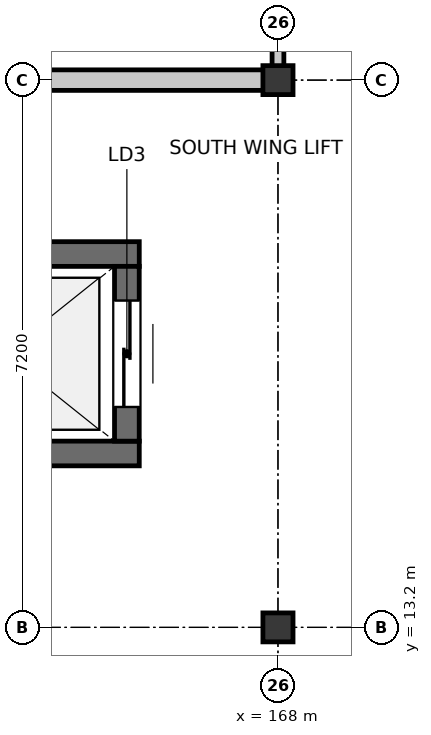
"""IFC4 building model, lengths in metres.
Left out: names, types, materials, properties, quantities, classifications, styles, units other than length and angle.
Written with IfcOpenShell. Run it as: python <this file> out.ifc"""

import sys

from ifc_helpers import new_model, si_unit, direction, frame, frame_2d, origin, origin_2d, place, context, subcontext, project, spatial, rectangle, i_section, extrude, element, fill, save


model = new_model("IFC4")
c1 = context("Model", 3, precision=1e-05, world=origin(), true_north=direction((0.0, 1.0)))
c2 = subcontext(c1, "Body", "Model", "MODEL_VIEW")
j1 = project(units=[si_unit("LENGTHUNIT", "METRE"), si_unit("PLANEANGLEUNIT", "RADIAN")], contexts=[c1])
p1 = place(None, origin())
s1 = spatial("IfcSite", under=j1, at=p1, CompositionType="ELEMENT")
p2 = place(p1, origin())
s2 = spatial("IfcBuilding", under=s1, at=p2, CompositionType="ELEMENT")
p3 = place(p2, origin())
s3 = spatial("IfcBuildingStorey", under=s2, at=p3, CompositionType="ELEMENT", Elevation=0.0)
for number, where, z_axis, x_axis in (
    (1, (168.0, 13.2, 0.0), (0.0, 0.0, 1.0), (1.0, 0.0, 0.0)),
    (2, (168.0, 20.4, 0.0), (0.0, 0.0, 1.0), (1.0, 0.0, 0.0)),
):
    element("IfcColumn", number, at=place(p3, frame(where, z_axis=z_axis, x_axis=x_axis)), inside=s3, PredefinedType="COLUMN", context=c2, shape_type="SweptSolid", body=[
        extrude(i_section(OverallWidth=0.396, OverallDepth=0.381, WebThickness=0.019, FlangeThickness=0.03, FilletRadius=0.015, at=origin_2d()), origin(), (0.0, 0.0, 1.0), 5.4),
    ])
for number, where, z_axis, x_axis in (
    (3, (166.175, 15.488, 0.0), (0.0, 0.0, 1.0), (-1.0, 0.0, 0.0)),
    (4, (162.625, 18.112, 0.0), (0.0, 0.0, 1.0), (1.0, 0.0, 0.0)),
):
    element("IfcWall", number, at=place(p3, frame(where, z_axis=z_axis, x_axis=x_axis)), inside=s3, PredefinedType="SHEAR", context=c2, shape_type="SweptSolid", body=[
        extrude(rectangle(XDim=3.55, YDim=0.325, at=frame_2d((1.775, 0.0))), origin(), (0.0, 0.0, 1.0), 5.14),
    ])
p4 = place(p3, frame((166.012, 17.95, 0.0), z_axis=(0.0, 0.0, 1.0), x_axis=(0.0, -1.0, 0.0)))
e5 = element("IfcWall", 5, at=p4, inside=s3, PredefinedType="SHEAR", context=c2, shape_type="SweptSolid", body=[
    extrude(rectangle(XDim=2.3, YDim=0.325, at=frame_2d((1.15, 0.0))), origin(), (0.0, 0.0, 1.0), 5.14),
])
p5 = place(p4, frame((0.45, 0.0, 0.0)))
e6 = element("IfcOpeningElement", 6, at=p5, cuts=e5, PredefinedType="OPENING", context=c2, shape_type="SweptSolid", body=[
    extrude(rectangle(XDim=1.4, YDim=2.3, at=frame_2d((0.7, 1.15))), frame((0.0, 0.172, 0.0), z_axis=(0.0, -1.0, 0.0), x_axis=(1.0, 0.0, 0.0)), (0.0, 0.0, 1.0), 0.345),
])
p6 = place(p3, frame((168.08, 20.4, 0.0), z_axis=(0.0, 0.0, 1.0), x_axis=(-1.0, 0.0, 0.0)))
e7 = element("IfcWall", 7, at=p6, inside=s3, PredefinedType="PARTITIONING", context=c2, shape_type="SweptSolid", body=[
    extrude(rectangle(XDim=14.348, YDim=0.27, at=frame_2d((7.174, 0.0))), origin(), (0.0, 0.0, 1.0), 4.437),
])
p7 = place(p3, frame((168.0, 59.95, 0.0), z_axis=(0.0, 0.0, 1.0), x_axis=(0.0, -1.0, 0.0)))
e8 = element("IfcWall", 8, at=p7, inside=s3, PredefinedType="PARTITIONING", context=c2, shape_type="SweptSolid", body=[
    extrude(rectangle(XDim=39.413, YDim=0.155, at=frame_2d((19.707, 0.0))), origin(), (0.0, 0.0, 1.0), 4.437),
])
p8 = place(p7, frame((18.967, 0.0, 0.0)))
e9 = element("IfcOpeningElement", 9, at=p8, cuts=e8, PredefinedType="OPENING", context=c2, shape_type="SweptSolid", body=[
    extrude(rectangle(XDim=1.48, YDim=2.22, at=frame_2d((0.74, 1.11))), frame((0.0, 0.087, 0.0), z_axis=(0.0, -1.0, 0.0), x_axis=(1.0, 0.0, 0.0)), (0.0, 0.0, 1.0), 0.175),
])
p9 = place(p7, frame((21.697, 0.0, 0.95)))
e10 = element("IfcOpeningElement", 10, at=p9, cuts=e8, PredefinedType="OPENING", context=c2, shape_type="SweptSolid", body=[
    extrude(rectangle(XDim=1.65, YDim=1.3, at=frame_2d((0.825, 0.65))), frame((0.0, 0.087, 0.0), z_axis=(0.0, -1.0, 0.0), x_axis=(1.0, 0.0, 0.0)), (0.0, 0.0, 1.0), 0.175),
])
p10 = place(p5, origin())
e11 = element("IfcDoor", 11, at=p10, inside=s3, OperationType="DOUBLE_DOOR_SLIDING", PredefinedType="DOOR", context=c2, shape_type="SweptSolid", body=[
    extrude(rectangle(XDim=1.4, YDim=2.3, at=frame_2d((0.7, 1.15))), frame((0.0, 0.025, 0.0), z_axis=(0.0, -1.0, 0.0), x_axis=(1.0, 0.0, 0.0)), (0.0, 0.0, 1.0), 0.05),
])
fill(e6, e11)
save(model, sys.argv[1])
